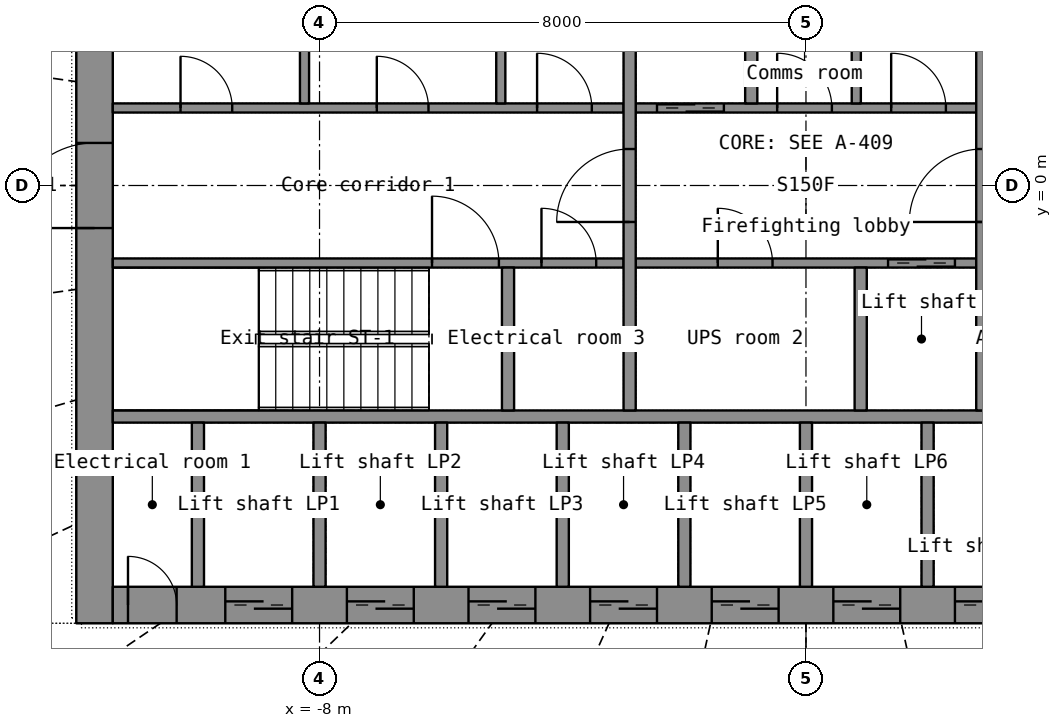
"""IFC4 building model, lengths in metres.
Left out: names, types, materials, properties, quantities, classifications, styles, units other than length and angle.
Written with IfcOpenShell. Run it as: python <this file> out.ifc"""

import sys

from ifc_helpers import new_model, si_unit, direction, frame, frame_2d, origin, place, context, subcontext, project, spatial, rectangle, extrude, element, fill, save


model = new_model("IFC4")
c1 = context("Model", 3, precision=1e-05, world=origin(), true_north=direction((0.0, 1.0)))
c2 = subcontext(c1, "Body", "Model", "MODEL_VIEW")
j1 = project(units=[si_unit("LENGTHUNIT", "METRE"), si_unit("PLANEANGLEUNIT", "RADIAN")], contexts=[c1])
p1 = place(None, origin())
s1 = spatial("IfcSite", under=j1, at=p1, CompositionType="ELEMENT")
p2 = place(p1, origin())
s2 = spatial("IfcBuilding", under=s1, at=p2, CompositionType="ELEMENT")
p3 = place(p2, frame((0.0, 0.0, 55.6)))
s3 = spatial("IfcBuildingStorey", under=s2, at=p3, CompositionType="ELEMENT", Elevation=55.6)
p4 = place(p3, frame((-11.7, -7.2, 0.0), z_axis=(0.0, 0.0, 1.0), x_axis=(0.0, 1.0, 0.0)))
e1 = element("IfcWall", 1, at=p4, inside=s3, PredefinedType="SHEAR", context=c2, shape_type="SweptSolid", body=[
    extrude(rectangle(XDim=14.4, YDim=0.6, at=frame_2d((7.2, 0.0))), origin(), (0.0, 0.0, 1.0), 3.3),
])
p5 = place(p4, frame((6.5, 0.0, 0.0)))
e2 = element("IfcOpeningElement", 2, at=p5, cuts=e1, PredefinedType="OPENING", context=c2, shape_type="SweptSolid", body=[
    extrude(rectangle(XDim=1.4, YDim=2.2, at=frame_2d((0.7, 1.1))), frame((0.0, 0.31, 0.0), z_axis=(0.0, -1.0, 0.0), x_axis=(1.0, 0.0, 0.0)), (0.0, 0.0, 1.0), 0.62),
])
p6 = place(p3, frame((-11.4, -6.9, 0.0), z_axis=(0.0, 0.0, 1.0), x_axis=(1.0, 0.0, 0.0)))
e3 = element("IfcWall", 3, at=p6, inside=s3, PredefinedType="SHEAR", context=c2, shape_type="SweptSolid", body=[
    extrude(rectangle(XDim=22.8, YDim=0.6, at=frame_2d((11.4, 0.0))), origin(), (0.0, 0.0, 1.0), 3.3),
])
p7 = place(p6, frame((1.85, 0.0, 0.0)))
e4 = element("IfcOpeningElement", 4, at=p7, cuts=e3, PredefinedType="OPENING", context=c2, shape_type="SweptSolid", body=[
    extrude(rectangle(XDim=1.1, YDim=2.2, at=frame_2d((0.55, 1.1))), frame((0.0, 0.31, 0.0), z_axis=(0.0, -1.0, 0.0), x_axis=(1.0, 0.0, 0.0)), (0.0, 0.0, 1.0), 0.62),
])
p8 = place(p6, frame((3.85, 0.0, 0.0)))
e5 = element("IfcOpeningElement", 5, at=p8, cuts=e3, PredefinedType="OPENING", context=c2, shape_type="SweptSolid", body=[
    extrude(rectangle(XDim=1.1, YDim=2.2, at=frame_2d((0.55, 1.1))), frame((0.0, 0.31, 0.0), z_axis=(0.0, -1.0, 0.0), x_axis=(1.0, 0.0, 0.0)), (0.0, 0.0, 1.0), 0.62),
])
p9 = place(p6, frame((5.85, 0.0, 0.0)))
e6 = element("IfcOpeningElement", 6, at=p9, cuts=e3, PredefinedType="OPENING", context=c2, shape_type="SweptSolid", body=[
    extrude(rectangle(XDim=1.1, YDim=2.2, at=frame_2d((0.55, 1.1))), frame((0.0, 0.31, 0.0), z_axis=(0.0, -1.0, 0.0), x_axis=(1.0, 0.0, 0.0)), (0.0, 0.0, 1.0), 0.62),
])
p10 = place(p6, frame((7.85, 0.0, 0.0)))
e7 = element("IfcOpeningElement", 7, at=p10, cuts=e3, PredefinedType="OPENING", context=c2, shape_type="SweptSolid", body=[
    extrude(rectangle(XDim=1.1, YDim=2.2, at=frame_2d((0.55, 1.1))), frame((0.0, 0.31, 0.0), z_axis=(0.0, -1.0, 0.0), x_axis=(1.0, 0.0, 0.0)), (0.0, 0.0, 1.0), 0.62),
])
p11 = place(p6, frame((9.85, 0.0, 0.0)))
e8 = element("IfcOpeningElement", 8, at=p11, cuts=e3, PredefinedType="OPENING", context=c2, shape_type="SweptSolid", body=[
    extrude(rectangle(XDim=1.1, YDim=2.2, at=frame_2d((0.55, 1.1))), frame((0.0, 0.31, 0.0), z_axis=(0.0, -1.0, 0.0), x_axis=(1.0, 0.0, 0.0)), (0.0, 0.0, 1.0), 0.62),
])
p12 = place(p6, frame((11.85, 0.0, 0.0)))
e9 = element("IfcOpeningElement", 9, at=p12, cuts=e3, PredefinedType="OPENING", context=c2, shape_type="SweptSolid", body=[
    extrude(rectangle(XDim=1.1, YDim=2.2, at=frame_2d((0.55, 1.1))), frame((0.0, 0.31, 0.0), z_axis=(0.0, -1.0, 0.0), x_axis=(1.0, 0.0, 0.0)), (0.0, 0.0, 1.0), 0.62),
])
p13 = place(p6, frame((13.85, 0.0, 0.0)))
e10 = element("IfcOpeningElement", 10, at=p13, cuts=e3, PredefinedType="OPENING", context=c2, shape_type="SweptSolid", body=[
    extrude(rectangle(XDim=1.1, YDim=2.2, at=frame_2d((0.55, 1.1))), frame((0.0, 0.31, 0.0), z_axis=(0.0, -1.0, 0.0), x_axis=(1.0, 0.0, 0.0)), (0.0, 0.0, 1.0), 0.62),
])
p14 = place(p6, frame((15.85, 0.0, 0.0)))
e11 = element("IfcOpeningElement", 11, at=p14, cuts=e3, PredefinedType="OPENING", context=c2, shape_type="SweptSolid", body=[
    extrude(rectangle(XDim=1.1, YDim=2.2, at=frame_2d((0.55, 1.1))), frame((0.0, 0.31, 0.0), z_axis=(0.0, -1.0, 0.0), x_axis=(1.0, 0.0, 0.0)), (0.0, 0.0, 1.0), 0.62),
])
p15 = place(p6, frame((19.85, 0.0, 0.0)))
e12 = element("IfcOpeningElement", 12, at=p15, cuts=e3, PredefinedType="OPENING", context=c2, shape_type="SweptSolid", body=[
    extrude(rectangle(XDim=1.1, YDim=2.2, at=frame_2d((0.55, 1.1))), frame((0.0, 0.31, 0.0), z_axis=(0.0, -1.0, 0.0), x_axis=(1.0, 0.0, 0.0)), (0.0, 0.0, 1.0), 0.62),
])
p16 = place(p6, frame((0.25, 0.0, 0.0)))
e13 = element("IfcOpeningElement", 13, at=p16, cuts=e3, PredefinedType="OPENING", context=c2, shape_type="SweptSolid", body=[
    extrude(rectangle(XDim=0.8, YDim=2.05, at=frame_2d((0.4, 1.025))), frame((0.0, 0.31, 0.0), z_axis=(0.0, -1.0, 0.0), x_axis=(1.0, 0.0, 0.0)), (0.0, 0.0, 1.0), 0.62),
])
p17 = place(p6, frame((21.75, 0.0, 0.0)))
e14 = element("IfcOpeningElement", 14, at=p17, cuts=e3, PredefinedType="OPENING", context=c2, shape_type="SweptSolid", body=[
    extrude(rectangle(XDim=0.8, YDim=2.05, at=frame_2d((0.4, 1.025))), frame((0.0, 0.31, 0.0), z_axis=(0.0, -1.0, 0.0), x_axis=(1.0, 0.0, 0.0)), (0.0, 0.0, 1.0), 0.62),
])
p18 = place(p3, frame((-11.4, -3.8, 0.0), z_axis=(0.0, 0.0, 1.0), x_axis=(1.0, 0.0, 0.0)))
e15 = element("IfcWall", 15, at=p18, inside=s3, PredefinedType="SHEAR", context=c2, shape_type="SweptSolid", body=[
    extrude(rectangle(XDim=22.8, YDim=0.2, at=frame_2d((11.4, 0.0))), origin(), (0.0, 0.0, 1.0), 3.3),
])
for number, where, z_axis, x_axis in (
    (16, (-10.0, -6.6, 0.0), (0.0, 0.0, 1.0), (0.0, 1.0, 0.0)),
    (17, (-8.0, -6.6, 0.0), (0.0, 0.0, 1.0), (0.0, 1.0, 0.0)),
    (18, (-6.0, -6.6, 0.0), (0.0, 0.0, 1.0), (0.0, 1.0, 0.0)),
    (19, (-4.0, -6.6, 0.0), (0.0, 0.0, 1.0), (0.0, 1.0, 0.0)),
    (20, (-2.0, -6.6, 0.0), (0.0, 0.0, 1.0), (0.0, 1.0, 0.0)),
    (21, (0.0, -6.6, 0.0), (0.0, 0.0, 1.0), (0.0, 1.0, 0.0)),
    (22, (2.0, -6.6, 0.0), (0.0, 0.0, 1.0), (0.0, 1.0, 0.0)),
):
    element("IfcWall", number, at=place(p3, frame(where, z_axis=z_axis, x_axis=x_axis)), inside=s3, PredefinedType="SHEAR", context=c2, shape_type="SweptSolid", body=[
        extrude(rectangle(XDim=2.7, YDim=0.2, at=frame_2d((1.35, 0.0))), origin(), (0.0, 0.0, 1.0), 3.3),
    ])
p19 = place(p3, frame((-11.4, -1.275, 0.0), z_axis=(0.0, 0.0, 1.0), x_axis=(1.0, 0.0, 0.0)))
e23 = element("IfcWall", 23, at=p19, inside=s3, PredefinedType="SHEAR", context=c2, shape_type="SweptSolid", body=[
    extrude(rectangle(XDim=8.4, YDim=0.15, at=frame_2d((4.2, 0.0))), origin(), (0.0, 0.0, 1.0), 3.3),
])
p20 = place(p19, frame((5.25, 0.0, 0.0)))
e24 = element("IfcOpeningElement", 24, at=p20, cuts=e23, PredefinedType="OPENING", context=c2, shape_type="SweptSolid", body=[
    extrude(rectangle(XDim=1.1, YDim=2.15, at=frame_2d((0.55, 1.075))), frame((0.0, 0.085, 0.0), z_axis=(0.0, -1.0, 0.0), x_axis=(1.0, 0.0, 0.0)), (0.0, 0.0, 1.0), 0.17),
])
p21 = place(p19, frame((7.05, 0.0, 0.0)))
e25 = element("IfcOpeningElement", 25, at=p21, cuts=e23, PredefinedType="OPENING", context=c2, shape_type="SweptSolid", body=[
    extrude(rectangle(XDim=0.9, YDim=2.1, at=frame_2d((0.45, 1.05))), frame((0.0, 0.085, 0.0), z_axis=(0.0, -1.0, 0.0), x_axis=(1.0, 0.0, 0.0)), (0.0, 0.0, 1.0), 0.17),
])
p22 = place(p3, frame((-2.8, -1.275, 0.0), z_axis=(0.0, 0.0, 1.0), x_axis=(1.0, 0.0, 0.0)))
e26 = element("IfcWall", 26, at=p22, inside=s3, PredefinedType="SHEAR", context=c2, shape_type="SweptSolid", body=[
    extrude(rectangle(XDim=5.6, YDim=0.15, at=frame_2d((2.8, 0.0))), origin(), (0.0, 0.0, 1.0), 3.3),
])
p23 = place(p22, frame((4.15, 0.0, 0.0)))
e27 = element("IfcOpeningElement", 27, at=p23, cuts=e26, PredefinedType="OPENING", context=c2, shape_type="SweptSolid", body=[
    extrude(rectangle(XDim=1.1, YDim=2.2, at=frame_2d((0.55, 1.1))), frame((0.0, 0.085, 0.0), z_axis=(0.0, -1.0, 0.0), x_axis=(1.0, 0.0, 0.0)), (0.0, 0.0, 1.0), 0.17),
])
p24 = place(p22, frame((1.35, 0.0, 0.0)))
e28 = element("IfcOpeningElement", 28, at=p24, cuts=e26, PredefinedType="OPENING", context=c2, shape_type="SweptSolid", body=[
    extrude(rectangle(XDim=0.9, YDim=2.1, at=frame_2d((0.45, 1.05))), frame((0.0, 0.085, 0.0), z_axis=(0.0, -1.0, 0.0), x_axis=(1.0, 0.0, 0.0)), (0.0, 0.0, 1.0), 0.17),
])
p25 = place(p3, frame((-11.4, 1.275, 0.0), z_axis=(0.0, 0.0, 1.0), x_axis=(1.0, 0.0, 0.0)))
e29 = element("IfcWall", 29, at=p25, inside=s3, PredefinedType="PARTITIONING", context=c2, shape_type="SweptSolid", body=[
    extrude(rectangle(XDim=8.4, YDim=0.15, at=frame_2d((4.2, 0.0))), origin(), (0.0, 0.0, 1.0), 3.3),
])
p26 = place(p25, frame((1.114, 0.0, 0.0)))
e30 = element("IfcOpeningElement", 30, at=p26, cuts=e29, PredefinedType="OPENING", context=c2, shape_type="SweptSolid", body=[
    extrude(rectangle(XDim=0.85, YDim=2.1, at=frame_2d((0.425, 1.05))), frame((0.0, 0.085, 0.0), z_axis=(0.0, -1.0, 0.0), x_axis=(1.0, 0.0, 0.0)), (0.0, 0.0, 1.0), 0.17),
])
p27 = place(p25, frame((4.342, 0.0, 0.0)))
e31 = element("IfcOpeningElement", 31, at=p27, cuts=e29, PredefinedType="OPENING", context=c2, shape_type="SweptSolid", body=[
    extrude(rectangle(XDim=0.85, YDim=2.1, at=frame_2d((0.425, 1.05))), frame((0.0, 0.085, 0.0), z_axis=(0.0, -1.0, 0.0), x_axis=(1.0, 0.0, 0.0)), (0.0, 0.0, 1.0), 0.17),
])
p28 = place(p25, frame((6.978, 0.0, 0.0)))
e32 = element("IfcOpeningElement", 32, at=p28, cuts=e29, PredefinedType="OPENING", context=c2, shape_type="SweptSolid", body=[
    extrude(rectangle(XDim=0.9, YDim=2.1, at=frame_2d((0.45, 1.05))), frame((0.0, 0.085, 0.0), z_axis=(0.0, -1.0, 0.0), x_axis=(1.0, 0.0, 0.0)), (0.0, 0.0, 1.0), 0.17),
])
p29 = place(p3, frame((-2.8, 1.275, 0.0), z_axis=(0.0, 0.0, 1.0), x_axis=(1.0, 0.0, 0.0)))
e33 = element("IfcWall", 33, at=p29, inside=s3, PredefinedType="SHEAR", context=c2, shape_type="SweptSolid", body=[
    extrude(rectangle(XDim=5.6, YDim=0.15, at=frame_2d((2.8, 0.0))), origin(), (0.0, 0.0, 1.0), 3.3),
])
p30 = place(p29, frame((0.35, 0.0, 0.0)))
e34 = element("IfcOpeningElement", 34, at=p30, cuts=e33, PredefinedType="OPENING", context=c2, shape_type="SweptSolid", body=[
    extrude(rectangle(XDim=1.1, YDim=2.2, at=frame_2d((0.55, 1.1))), frame((0.0, 0.085, 0.0), z_axis=(0.0, -1.0, 0.0), x_axis=(1.0, 0.0, 0.0)), (0.0, 0.0, 1.0), 0.17),
])
p31 = place(p29, frame((2.326, 0.0, 0.0)))
e35 = element("IfcOpeningElement", 35, at=p31, cuts=e33, PredefinedType="OPENING", context=c2, shape_type="SweptSolid", body=[
    extrude(rectangle(XDim=0.9, YDim=2.1, at=frame_2d((0.45, 1.05))), frame((0.0, 0.085, 0.0), z_axis=(0.0, -1.0, 0.0), x_axis=(1.0, 0.0, 0.0)), (0.0, 0.0, 1.0), 0.17),
])
p32 = place(p29, frame((4.201, 0.0, 0.0)))
e36 = element("IfcOpeningElement", 36, at=p32, cuts=e33, PredefinedType="OPENING", context=c2, shape_type="SweptSolid", body=[
    extrude(rectangle(XDim=0.9, YDim=2.1, at=frame_2d((0.45, 1.05))), frame((0.0, 0.085, 0.0), z_axis=(0.0, -1.0, 0.0), x_axis=(1.0, 0.0, 0.0)), (0.0, 0.0, 1.0), 0.17),
])
p33 = place(p3, frame((-2.9, -3.7, 0.0), z_axis=(0.0, 0.0, 1.0), x_axis=(0.0, 1.0, 0.0)))
e37 = element("IfcWall", 37, at=p33, inside=s3, PredefinedType="SHEAR", context=c2, shape_type="SweptSolid", body=[
    extrude(rectangle(XDim=7.4, YDim=0.2, at=frame_2d((3.7, 0.0))), origin(), (0.0, 0.0, 1.0), 3.3),
])
p34 = place(p33, frame((3.1, 0.0, 0.0)))
e38 = element("IfcOpeningElement", 38, at=p34, cuts=e37, PredefinedType="OPENING", context=c2, shape_type="SweptSolid", body=[
    extrude(rectangle(XDim=1.2, YDim=2.2, at=frame_2d((0.6, 1.1))), frame((0.0, 0.11, 0.0), z_axis=(0.0, -1.0, 0.0), x_axis=(1.0, 0.0, 0.0)), (0.0, 0.0, 1.0), 0.22),
])
p35 = place(p3, frame((2.9, -3.7, 0.0), z_axis=(0.0, 0.0, 1.0), x_axis=(0.0, 1.0, 0.0)))
e39 = element("IfcWall", 39, at=p35, inside=s3, PredefinedType="SHEAR", context=c2, shape_type="SweptSolid", body=[
    extrude(rectangle(XDim=7.4, YDim=0.2, at=frame_2d((3.7, 0.0))), origin(), (0.0, 0.0, 1.0), 3.3),
])
p36 = place(p35, frame((3.1, 0.0, 0.0)))
e40 = element("IfcOpeningElement", 40, at=p36, cuts=e39, PredefinedType="OPENING", context=c2, shape_type="SweptSolid", body=[
    extrude(rectangle(XDim=1.2, YDim=2.2, at=frame_2d((0.6, 1.1))), frame((0.0, 0.11, 0.0), z_axis=(0.0, -1.0, 0.0), x_axis=(1.0, 0.0, 0.0)), (0.0, 0.0, 1.0), 0.22),
])
for number, where, z_axis, x_axis in (
    (41, (-0.9, 1.35, 0.0), (0.0, 0.0, 1.0), (0.0, 1.0, 0.0)),
    (42, (0.9, -3.7, 0.0), (0.0, 0.0, 1.0), (0.0, 1.0, 0.0)),
    (43, (-4.9, -3.7, 0.0), (0.0, 0.0, 1.0), (0.0, 1.0, 0.0)),
):
    element("IfcWall", number, at=place(p3, frame(where, z_axis=z_axis, x_axis=x_axis)), inside=s3, PredefinedType="SHEAR", context=c2, shape_type="SweptSolid", body=[
        extrude(rectangle(XDim=2.35, YDim=0.2, at=frame_2d((1.175, 0.0))), origin(), (0.0, 0.0, 1.0), 3.3),
    ])
for number, where, z_axis, x_axis in (
    (44, (-8.247, 1.35, 0.0), (0.0, 0.0, 1.0), (0.0, 1.0, 0.0)),
    (45, (-5.019, 1.35, 0.0), (0.0, 0.0, 1.0), (0.0, 1.0, 0.0)),
    (46, (0.827, 1.35, 0.0), (0.0, 0.0, 1.0), (0.0, 1.0, 0.0)),
):
    element("IfcWall", number, at=place(p3, frame(where, z_axis=z_axis, x_axis=x_axis)), inside=s3, PredefinedType="PARTITIONING", context=c2, shape_type="SweptSolid", body=[
        extrude(rectangle(XDim=2.35, YDim=0.15, at=frame_2d((1.175, 0.0))), origin(), (0.0, 0.0, 1.0), 3.3),
    ])
p37 = place(p7, origin())
e47 = element("IfcDoor", 47, at=p37, inside=s3, OperationType="DOUBLE_DOOR_SLIDING", PredefinedType="DOOR", context=c2, shape_type="SweptSolid", body=[
    extrude(rectangle(XDim=1.1, YDim=2.2, at=frame_2d((0.55, 1.1))), frame((0.0, 0.025, 0.0), z_axis=(0.0, -1.0, 0.0), x_axis=(1.0, 0.0, 0.0)), (0.0, 0.0, 1.0), 0.05),
])
fill(e4, e47)
p38 = place(p8, origin())
e48 = element("IfcDoor", 48, at=p38, inside=s3, OperationType="DOUBLE_DOOR_SLIDING", PredefinedType="DOOR", context=c2, shape_type="SweptSolid", body=[
    extrude(rectangle(XDim=1.1, YDim=2.2, at=frame_2d((0.55, 1.1))), frame((0.0, 0.025, 0.0), z_axis=(0.0, -1.0, 0.0), x_axis=(1.0, 0.0, 0.0)), (0.0, 0.0, 1.0), 0.05),
])
fill(e5, e48)
p39 = place(p9, origin())
e49 = element("IfcDoor", 49, at=p39, inside=s3, OperationType="DOUBLE_DOOR_SLIDING", PredefinedType="DOOR", context=c2, shape_type="SweptSolid", body=[
    extrude(rectangle(XDim=1.1, YDim=2.2, at=frame_2d((0.55, 1.1))), frame((0.0, 0.025, 0.0), z_axis=(0.0, -1.0, 0.0), x_axis=(1.0, 0.0, 0.0)), (0.0, 0.0, 1.0), 0.05),
])
fill(e6, e49)
p40 = place(p10, origin())
e50 = element("IfcDoor", 50, at=p40, inside=s3, OperationType="DOUBLE_DOOR_SLIDING", PredefinedType="DOOR", context=c2, shape_type="SweptSolid", body=[
    extrude(rectangle(XDim=1.1, YDim=2.2, at=frame_2d((0.55, 1.1))), frame((0.0, 0.025, 0.0), z_axis=(0.0, -1.0, 0.0), x_axis=(1.0, 0.0, 0.0)), (0.0, 0.0, 1.0), 0.05),
])
fill(e7, e50)
p41 = place(p11, origin())
e51 = element("IfcDoor", 51, at=p41, inside=s3, OperationType="DOUBLE_DOOR_SLIDING", PredefinedType="DOOR", context=c2, shape_type="SweptSolid", body=[
    extrude(rectangle(XDim=1.1, YDim=2.2, at=frame_2d((0.55, 1.1))), frame((0.0, 0.025, 0.0), z_axis=(0.0, -1.0, 0.0), x_axis=(1.0, 0.0, 0.0)), (0.0, 0.0, 1.0), 0.05),
])
fill(e8, e51)
p42 = place(p12, origin())
e52 = element("IfcDoor", 52, at=p42, inside=s3, OperationType="DOUBLE_DOOR_SLIDING", PredefinedType="DOOR", context=c2, shape_type="SweptSolid", body=[
    extrude(rectangle(XDim=1.1, YDim=2.2, at=frame_2d((0.55, 1.1))), frame((0.0, 0.025, 0.0), z_axis=(0.0, -1.0, 0.0), x_axis=(1.0, 0.0, 0.0)), (0.0, 0.0, 1.0), 0.05),
])
fill(e9, e52)
p43 = place(p13, origin())
e53 = element("IfcDoor", 53, at=p43, inside=s3, OperationType="DOUBLE_DOOR_SLIDING", PredefinedType="DOOR", context=c2, shape_type="SweptSolid", body=[
    extrude(rectangle(XDim=1.1, YDim=2.2, at=frame_2d((0.55, 1.1))), frame((0.0, 0.025, 0.0), z_axis=(0.0, -1.0, 0.0), x_axis=(1.0, 0.0, 0.0)), (0.0, 0.0, 1.0), 0.05),
])
fill(e10, e53)
p44 = place(p16, origin())
e54 = element("IfcDoor", 54, at=p44, inside=s3, OperationType="SINGLE_SWING_LEFT", PredefinedType="DOOR", context=c2, shape_type="SweptSolid", body=[
    extrude(rectangle(XDim=0.8, YDim=2.05, at=frame_2d((0.4, 1.025))), frame((0.0, 0.025, 0.0), z_axis=(0.0, -1.0, 0.0), x_axis=(1.0, 0.0, 0.0)), (0.0, 0.0, 1.0), 0.05),
])
fill(e13, e54)
p45 = place(p5, origin())
e55 = element("IfcDoor", 55, at=p45, inside=s3, OperationType="DOUBLE_DOOR_SINGLE_SWING", PredefinedType="DOOR", context=c2, shape_type="SweptSolid", body=[
    extrude(rectangle(XDim=1.4, YDim=2.2, at=frame_2d((0.7, 1.1))), frame((0.0, 0.025, 0.0), z_axis=(0.0, -1.0, 0.0), x_axis=(1.0, 0.0, 0.0)), (0.0, 0.0, 1.0), 0.05),
])
fill(e2, e55)
p46 = place(p34, origin())
e56 = element("IfcDoor", 56, at=p46, inside=s3, OperationType="SINGLE_SWING_LEFT", PredefinedType="DOOR", context=c2, shape_type="SweptSolid", body=[
    extrude(rectangle(XDim=1.2, YDim=2.2, at=frame_2d((0.6, 1.1))), frame((0.0, 0.025, 0.0), z_axis=(0.0, -1.0, 0.0), x_axis=(1.0, 0.0, 0.0)), (0.0, 0.0, 1.0), 0.05),
])
fill(e38, e56)
p47 = place(p36, origin())
e57 = element("IfcDoor", 57, at=p47, inside=s3, OperationType="SINGLE_SWING_LEFT", PredefinedType="DOOR", context=c2, shape_type="SweptSolid", body=[
    extrude(rectangle(XDim=1.2, YDim=2.2, at=frame_2d((0.6, 1.1))), frame((0.0, 0.025, 0.0), z_axis=(0.0, -1.0, 0.0), x_axis=(1.0, 0.0, 0.0)), (0.0, 0.0, 1.0), 0.05),
])
fill(e40, e57)
p48 = place(p30, origin())
e58 = element("IfcDoor", 58, at=p48, inside=s3, OperationType="DOUBLE_DOOR_SLIDING", PredefinedType="DOOR", context=c2, shape_type="SweptSolid", body=[
    extrude(rectangle(XDim=1.1, YDim=2.2, at=frame_2d((0.55, 1.1))), frame((0.0, 0.025, 0.0), z_axis=(0.0, -1.0, 0.0), x_axis=(1.0, 0.0, 0.0)), (0.0, 0.0, 1.0), 0.05),
])
fill(e34, e58)
p49 = place(p23, origin())
e59 = element("IfcDoor", 59, at=p49, inside=s3, OperationType="DOUBLE_DOOR_SLIDING", PredefinedType="DOOR", context=c2, shape_type="SweptSolid", body=[
    extrude(rectangle(XDim=1.1, YDim=2.2, at=frame_2d((0.55, 1.1))), frame((0.0, 0.025, 0.0), z_axis=(0.0, -1.0, 0.0), x_axis=(1.0, 0.0, 0.0)), (0.0, 0.0, 1.0), 0.05),
])
fill(e27, e59)
p50 = place(p20, origin())
e60 = element("IfcDoor", 60, at=p50, inside=s3, OperationType="SINGLE_SWING_LEFT", PredefinedType="DOOR", context=c2, shape_type="SweptSolid", body=[
    extrude(rectangle(XDim=1.1, YDim=2.15, at=frame_2d((0.55, 1.075))), frame((0.0, 0.025, 0.0), z_axis=(0.0, -1.0, 0.0), x_axis=(1.0, 0.0, 0.0)), (0.0, 0.0, 1.0), 0.05),
])
fill(e24, e60)
p51 = place(p26, origin())
e61 = element("IfcDoor", 61, at=p51, inside=s3, OperationType="SINGLE_SWING_LEFT", PredefinedType="DOOR", context=c2, shape_type="SweptSolid", body=[
    extrude(rectangle(XDim=0.85, YDim=2.1, at=frame_2d((0.425, 1.05))), frame((0.0, 0.025, 0.0), z_axis=(0.0, -1.0, 0.0), x_axis=(1.0, 0.0, 0.0)), (0.0, 0.0, 1.0), 0.05),
])
fill(e30, e61)
p52 = place(p27, origin())
e62 = element("IfcDoor", 62, at=p52, inside=s3, OperationType="SINGLE_SWING_LEFT", PredefinedType="DOOR", context=c2, shape_type="SweptSolid", body=[
    extrude(rectangle(XDim=0.85, YDim=2.1, at=frame_2d((0.425, 1.05))), frame((0.0, 0.025, 0.0), z_axis=(0.0, -1.0, 0.0), x_axis=(1.0, 0.0, 0.0)), (0.0, 0.0, 1.0), 0.05),
])
fill(e31, e62)
p53 = place(p28, origin())
e63 = element("IfcDoor", 63, at=p53, inside=s3, OperationType="SINGLE_SWING_LEFT", PredefinedType="DOOR", context=c2, shape_type="SweptSolid", body=[
    extrude(rectangle(XDim=0.9, YDim=2.1, at=frame_2d((0.45, 1.05))), frame((0.0, 0.025, 0.0), z_axis=(0.0, -1.0, 0.0), x_axis=(1.0, 0.0, 0.0)), (0.0, 0.0, 1.0), 0.05),
])
fill(e32, e63)
p54 = place(p31, origin())
e64 = element("IfcDoor", 64, at=p54, inside=s3, OperationType="SINGLE_SWING_LEFT", PredefinedType="DOOR", context=c2, shape_type="SweptSolid", body=[
    extrude(rectangle(XDim=0.9, YDim=2.1, at=frame_2d((0.45, 1.05))), frame((0.0, 0.025, 0.0), z_axis=(0.0, -1.0, 0.0), x_axis=(1.0, 0.0, 0.0)), (0.0, 0.0, 1.0), 0.05),
])
fill(e35, e64)
p55 = place(p32, origin())
e65 = element("IfcDoor", 65, at=p55, inside=s3, OperationType="SINGLE_SWING_LEFT", PredefinedType="DOOR", context=c2, shape_type="SweptSolid", body=[
    extrude(rectangle(XDim=0.9, YDim=2.1, at=frame_2d((0.45, 1.05))), frame((0.0, 0.025, 0.0), z_axis=(0.0, -1.0, 0.0), x_axis=(1.0, 0.0, 0.0)), (0.0, 0.0, 1.0), 0.05),
])
fill(e36, e65)
p56 = place(p24, origin())
e66 = element("IfcDoor", 66, at=p56, inside=s3, OperationType="SINGLE_SWING_LEFT", PredefinedType="DOOR", context=c2, shape_type="SweptSolid", body=[
    extrude(rectangle(XDim=0.9, YDim=2.1, at=frame_2d((0.45, 1.05))), frame((0.0, 0.025, 0.0), z_axis=(0.0, -1.0, 0.0), x_axis=(1.0, 0.0, 0.0)), (0.0, 0.0, 1.0), 0.05),
])
fill(e28, e66)
p57 = place(p21, origin())
e67 = element("IfcDoor", 67, at=p57, inside=s3, OperationType="SINGLE_SWING_LEFT", PredefinedType="DOOR", context=c2, shape_type="SweptSolid", body=[
    extrude(rectangle(XDim=0.9, YDim=2.1, at=frame_2d((0.45, 1.05))), frame((0.0, 0.025, 0.0), z_axis=(0.0, -1.0, 0.0), x_axis=(1.0, 0.0, 0.0)), (0.0, 0.0, 1.0), 0.05),
])
fill(e25, e67)
save(model, sys.argv[1])
